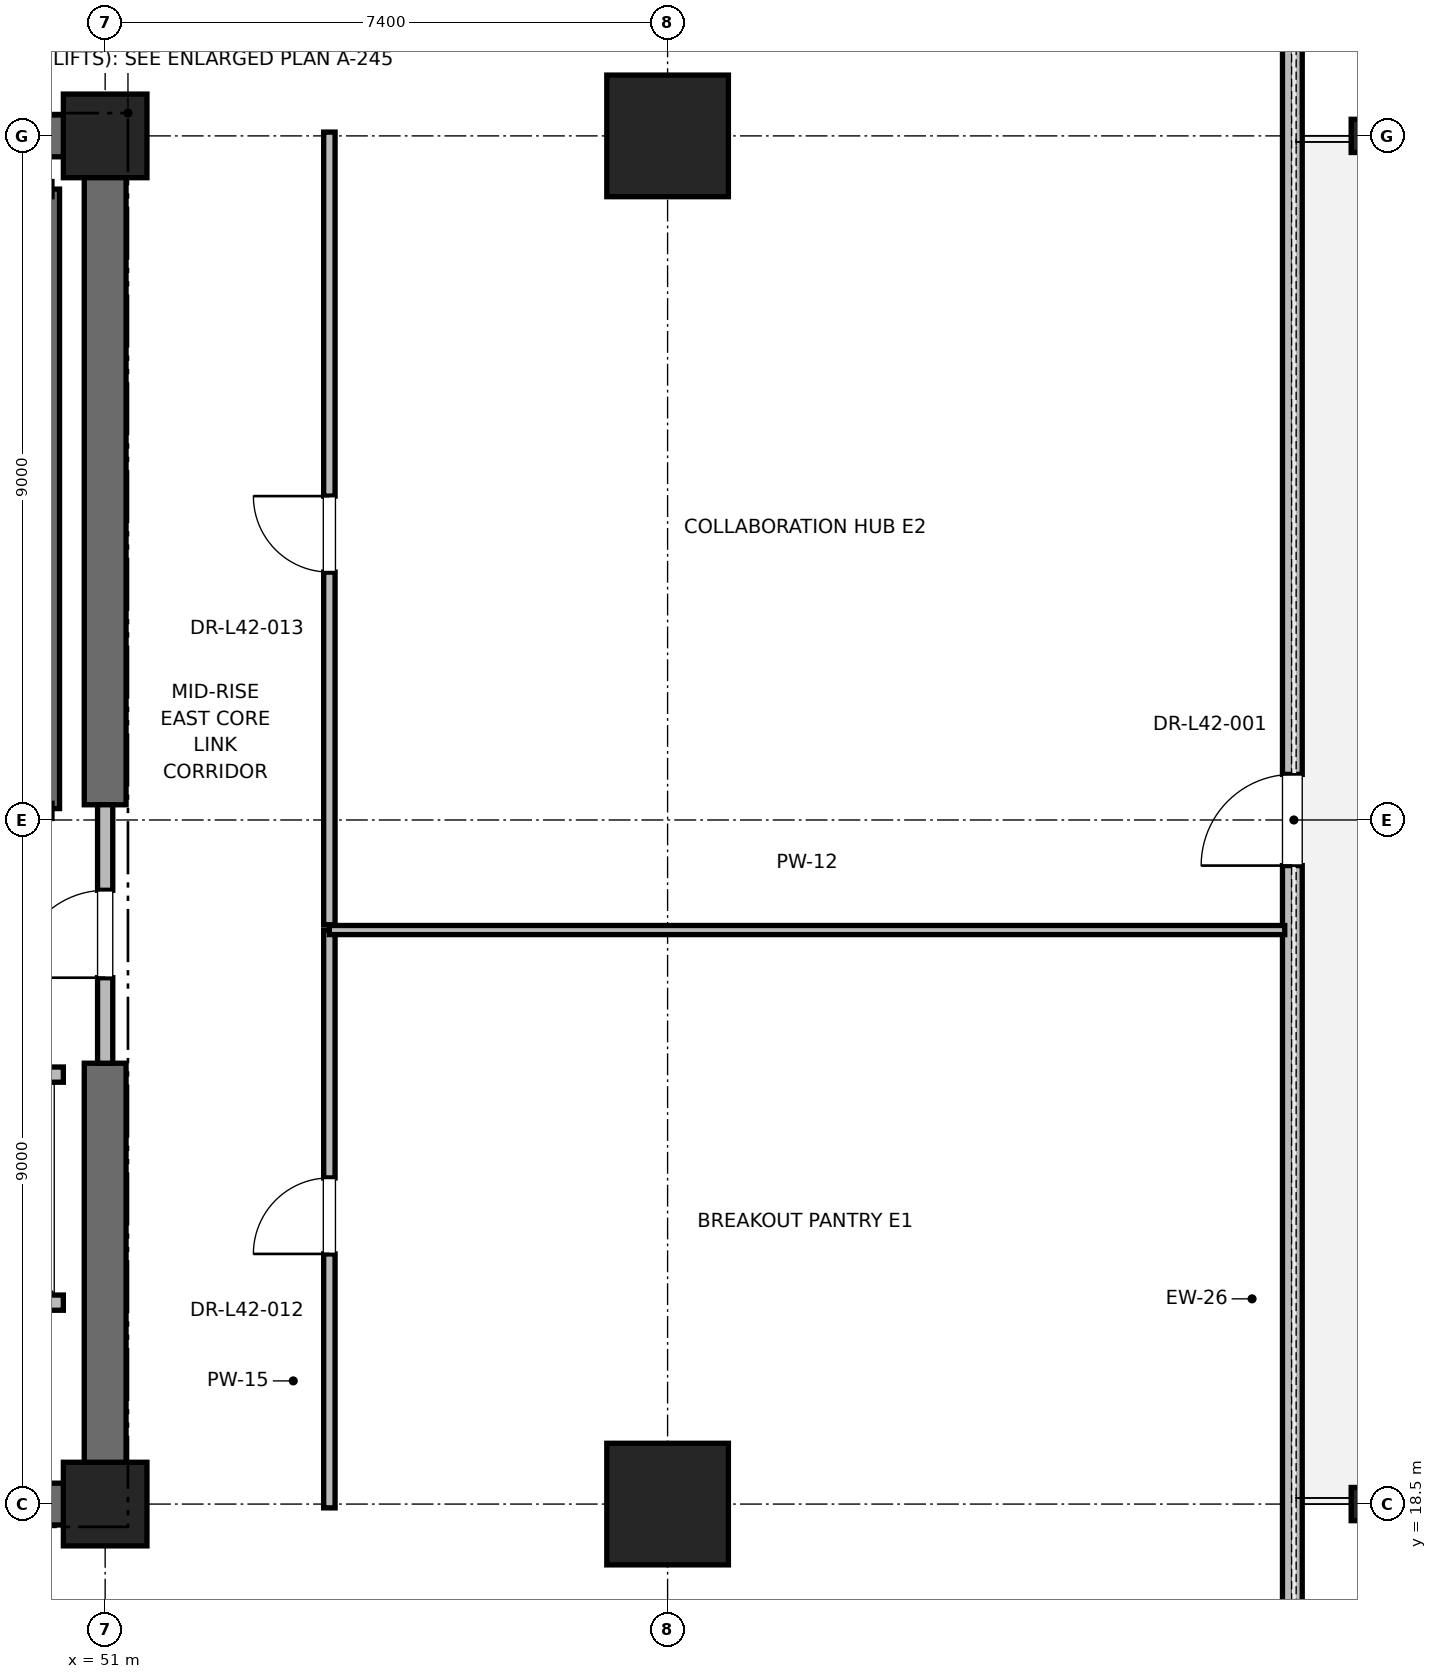
"""IFC4 building model, lengths in metres.
Left out: names, types, materials, properties, quantities, classifications, styles, units other than length and angle.
Written with IfcOpenShell. Run it as: python <this file> out.ifc"""

import sys

from ifc_helpers import new_model, si_unit, direction, frame, frame_2d, origin, origin_2d, place, context, subcontext, project, spatial, rectangle, i_section, extrude, element, fill, save


model = new_model("IFC4")
c1 = context("Model", 3, precision=1e-05, world=origin(), true_north=direction((0.0, 1.0)))
c2 = subcontext(c1, "Body", "Model", "MODEL_VIEW")
j1 = project(units=[si_unit("LENGTHUNIT", "METRE"), si_unit("PLANEANGLEUNIT", "RADIAN")], contexts=[c1])
p1 = place(None, origin())
s1 = spatial("IfcSite", under=j1, at=p1, CompositionType="ELEMENT")
p2 = place(p1, origin())
s2 = spatial("IfcBuilding", under=s1, at=p2, CompositionType="ELEMENT")
p3 = place(p2, frame((0.0, 0.0, 180.4)))
s3 = spatial("IfcBuildingStorey", under=s2, at=p3, CompositionType="ELEMENT", Elevation=180.4)
for number, where, z_axis, x_axis in (
    (1, (58.4, 18.5, 0.0), (0.0, 0.0, 1.0), (1.0, 0.0, 0.0)),
    (2, (58.4, 36.5, 0.0), (0.0, 0.0, 1.0), (1.0, 0.0, 0.0)),
):
    element("IfcColumn", number, at=place(p3, frame(where, z_axis=z_axis, x_axis=x_axis)), inside=s3, PredefinedType="COLUMN", context=c2, shape_type="SweptSolid", body=[
        extrude(rectangle(XDim=1.6, YDim=1.6, at=origin_2d()), origin(), (0.0, 0.0, 1.0), 4.0),
    ])
for number, where, z_axis, x_axis in (
    (3, (67.6, 18.5, 0.0), (0.0, 0.0, 1.0), (1.0, 0.0, 0.0)),
    (4, (67.6, 36.5, 0.0), (0.0, 0.0, 1.0), (1.0, 0.0, 0.0)),
):
    element("IfcColumn", number, at=place(p3, frame(where, z_axis=z_axis, x_axis=x_axis)), inside=s3, PredefinedType="COLUMN", context=c2, shape_type="SweptSolid", body=[
        extrude(i_section(OverallWidth=0.412, OverallDepth=0.437, WebThickness=0.036, FlangeThickness=0.058, FilletRadius=0.015, at=origin_2d()), origin(), (0.0, 0.0, 1.0), 4.0),
    ])
for number, where, z_axis, x_axis in (
    (5, (51.0, 18.5, 0.0), (0.0, 0.0, 1.0), (1.0, 0.0, 0.0)),
    (6, (51.0, 36.5, 0.0), (0.0, 0.0, 1.0), (1.0, 0.0, 0.0)),
):
    element("IfcColumn", number, at=place(p3, frame(where, z_axis=z_axis, x_axis=x_axis)), inside=s3, PredefinedType="PILASTER", context=c2, shape_type="SweptSolid", body=[
        extrude(rectangle(XDim=1.1, YDim=1.1, at=origin_2d()), origin(), (0.0, 0.0, 1.0), 4.0),
    ])
p4 = place(p3, frame((41.8, 18.5, 0.0), z_axis=(0.0, 0.0, 1.0), x_axis=(1.0, 0.0, 0.0)))
e7 = element("IfcWall", 7, at=p4, inside=s3, PredefinedType="SHEAR", context=c2, shape_type="SweptSolid", body=[
    extrude(rectangle(XDim=9.2, YDim=0.55, at=frame_2d((4.6, 0.0))), origin(), (0.0, 0.0, 1.0), 3.7),
])
for number, where, z_axis, x_axis in (
    (8, (45.2, 36.5, 0.0), (0.0, 0.0, 1.0), (1.0, 0.0, 0.0)),
    (9, (51.0, 18.5, 0.0), (0.0, 0.0, 1.0), (0.0, 1.0, 0.0)),
):
    element("IfcWall", number, at=place(p3, frame(where, z_axis=z_axis, x_axis=x_axis)), inside=s3, PredefinedType="SHEAR", context=c2, shape_type="SweptSolid", body=[
        extrude(rectangle(XDim=5.8, YDim=0.55, at=frame_2d((2.9, 0.0))), origin(), (0.0, 0.0, 1.0), 3.7),
    ])
p5 = place(p3, frame((51.0, 27.7, 0.0), z_axis=(0.0, 0.0, 1.0), x_axis=(0.0, 1.0, 0.0)))
e10 = element("IfcWall", 10, at=p5, inside=s3, PredefinedType="SHEAR", context=c2, shape_type="SweptSolid", body=[
    extrude(rectangle(XDim=8.8, YDim=0.55, at=frame_2d((4.4, 0.0))), origin(), (0.0, 0.0, 1.0), 3.7),
])
p6 = place(p3, frame((66.62, 9.3, 0.0), z_axis=(0.0, 0.0, 1.0), x_axis=(0.0, 1.0, 0.0)))
e11 = element("IfcWall", 11, at=p6, inside=s3, PredefinedType="PARAPET", context=c2, shape_type="SweptSolid", body=[
    extrude(rectangle(XDim=36.4, YDim=0.26, at=frame_2d((18.2, 0.0))), origin(), (0.0, 0.0, 1.0), 2.91),
])
p7 = place(p6, frame((4.2, 0.0, 0.85)))
e12 = element("IfcOpeningElement", 12, at=p7, cuts=e11, PredefinedType="OPENING", context=c2, shape_type="SweptSolid", body=[
    extrude(rectangle(XDim=2.0, YDim=2.3, at=frame_2d((1.0, 1.15))), frame((0.0, 0.13, 0.0), z_axis=(0.0, -1.0, 0.0), x_axis=(1.0, 0.0, 0.0)), (0.0, 0.0, 1.0), 0.26),
])
p8 = place(p6, frame((17.6, 0.0, 0.0)))
e13 = element("IfcOpeningElement", 13, at=p8, cuts=e11, PredefinedType="OPENING", context=c2, shape_type="SweptSolid", body=[
    extrude(rectangle(XDim=1.2, YDim=2.2, at=frame_2d((0.6, 1.1))), frame((0.0, 0.13, 0.0), z_axis=(0.0, -1.0, 0.0), x_axis=(1.0, 0.0, 0.0)), (0.0, 0.0, 1.0), 0.26),
])
p9 = place(p6, frame((30.2, 0.0, 0.85)))
e14 = element("IfcOpeningElement", 14, at=p9, cuts=e11, PredefinedType="OPENING", context=c2, shape_type="SweptSolid", body=[
    extrude(rectangle(XDim=2.0, YDim=2.3, at=frame_2d((1.0, 1.15))), frame((0.0, 0.13, 0.0), z_axis=(0.0, -1.0, 0.0), x_axis=(1.0, 0.0, 0.0)), (0.0, 0.0, 1.0), 0.26),
])
p10 = place(p3, frame((50.3, 27.65, 0.0), z_axis=(0.0, 0.0, 1.0), x_axis=(0.0, 1.0, 0.0)))
e15 = element("IfcWall", 15, at=p10, inside=s3, PredefinedType="SOLIDWALL", context=c2, shape_type="SweptSolid", body=[
    extrude(rectangle(XDim=8.15, YDim=0.2, at=frame_2d((4.075, 0.0))), origin(), (0.0, 0.0, 1.0), 3.7),
])
p11 = place(p3, frame((51.0, 24.3, 0.0), z_axis=(0.0, 0.0, 1.0), x_axis=(0.0, 1.0, 0.0)))
e16 = element("IfcWall", 16, at=p11, inside=s3, PredefinedType="PARTITIONING", context=c2, shape_type="SweptSolid", body=[
    extrude(rectangle(XDim=3.4, YDim=0.2, at=frame_2d((1.7, 0.0))), origin(), (0.0, 0.0, 1.0), 2.68),
])
p12 = place(p11, frame((1.125, 0.0, 0.0)))
e17 = element("IfcOpeningElement", 17, at=p12, cuts=e16, PredefinedType="OPENING", context=c2, shape_type="SweptSolid", body=[
    extrude(rectangle(XDim=1.15, YDim=2.2, at=frame_2d((0.575, 1.1))), frame((0.0, 0.1, 0.0), z_axis=(0.0, -1.0, 0.0), x_axis=(1.0, 0.0, 0.0)), (0.0, 0.0, 1.0), 0.2),
])
p13 = place(p3, frame((47.85, 21.15, 0.0), z_axis=(0.0, 0.0, 1.0), x_axis=(1.0, 0.0, 0.0)))
e18 = element("IfcWall", 18, at=p13, inside=s3, PredefinedType="SOLIDWALL", context=c2, shape_type="SweptSolid", body=[
    extrude(rectangle(XDim=2.6, YDim=0.2, at=frame_2d((1.3, 0.0))), origin(), (0.0, 0.0, 1.0), 3.7),
])
p14 = place(p3, frame((50.45, 24.15, 0.0), z_axis=(0.0, 0.0, 1.0), x_axis=(-1.0, 0.0, 0.0)))
e19 = element("IfcWall", 19, at=p14, inside=s3, PredefinedType="SOLIDWALL", context=c2, shape_type="SweptSolid", body=[
    extrude(rectangle(XDim=2.6, YDim=0.2, at=frame_2d((1.3, 0.0))), origin(), (0.0, 0.0, 1.0), 2.68),
])
p15 = place(p14, frame((0.75, 0.0, 0.0)))
e20 = element("IfcOpeningElement", 20, at=p15, cuts=e19, PredefinedType="OPENING", context=c2, shape_type="SweptSolid", body=[
    extrude(rectangle(XDim=1.1, YDim=2.2, at=frame_2d((0.55, 1.1))), frame((0.0, 0.1, 0.0), z_axis=(0.0, -1.0, 0.0), x_axis=(1.0, 0.0, 0.0)), (0.0, 0.0, 1.0), 0.2),
])
p16 = place(p3, frame((53.95, 18.45, 0.0), z_axis=(0.0, 0.0, 1.0), x_axis=(0.0, 1.0, 0.0)))
e21 = element("IfcWall", 21, at=p16, inside=s3, PredefinedType="PARTITIONING", context=c2, shape_type="SweptSolid", body=[
    extrude(rectangle(XDim=7.602, YDim=0.15, at=frame_2d((3.801, 0.0))), origin(), (0.0, 0.0, 1.0), 2.85),
])
p17 = place(p16, frame((3.341, 0.0, 0.0)))
e22 = element("IfcOpeningElement", 22, at=p17, cuts=e21, PredefinedType="OPENING", context=c2, shape_type="SweptSolid", body=[
    extrude(rectangle(XDim=1.0, YDim=2.15, at=frame_2d((0.5, 1.075))), frame((0.0, 0.075, 0.0), z_axis=(0.0, -1.0, 0.0), x_axis=(1.0, 0.0, 0.0)), (0.0, 0.0, 1.0), 0.15),
])
p18 = place(p3, frame((53.95, 26.052, 0.0), z_axis=(0.0, 0.0, 1.0), x_axis=(1.0, 0.0, 0.0)))
e23 = element("IfcWall", 23, at=p18, inside=s3, PredefinedType="PARTITIONING", context=c2, shape_type="SweptSolid", body=[
    extrude(rectangle(XDim=12.57, YDim=0.12, at=frame_2d((6.285, 0.0))), origin(), (0.0, 0.0, 1.0), 2.85),
])
p19 = place(p3, frame((53.95, 26.122, 0.0), z_axis=(0.0, 0.0, 1.0), x_axis=(0.0, 1.0, 0.0)))
e24 = element("IfcWall", 24, at=p19, inside=s3, PredefinedType="PARTITIONING", context=c2, shape_type="SweptSolid", body=[
    extrude(rectangle(XDim=10.428, YDim=0.15, at=frame_2d((5.214, 0.0))), origin(), (0.0, 0.0, 1.0), 2.85),
])
p20 = place(p19, frame((4.639, 0.0, 0.0)))
e25 = element("IfcOpeningElement", 25, at=p20, cuts=e24, PredefinedType="OPENING", context=c2, shape_type="SweptSolid", body=[
    extrude(rectangle(XDim=1.0, YDim=2.15, at=frame_2d((0.5, 1.075))), frame((0.0, 0.075, 0.0), z_axis=(0.0, -1.0, 0.0), x_axis=(1.0, 0.0, 0.0)), (0.0, 0.0, 1.0), 0.15),
])
p21 = place(p8, origin())
e26 = element("IfcDoor", 26, at=p21, inside=s3, OperationType="SINGLE_SWING_LEFT", PredefinedType="DOOR", context=c2, shape_type="SweptSolid", body=[
    extrude(rectangle(XDim=1.2, YDim=2.2, at=frame_2d((0.6, 1.1))), frame((0.0, 0.025, 0.0), z_axis=(0.0, -1.0, 0.0), x_axis=(1.0, 0.0, 0.0)), (0.0, 0.0, 1.0), 0.05),
])
fill(e13, e26)
p22 = place(p12, origin())
e27 = element("IfcDoor", 27, at=p22, inside=s3, OperationType="SINGLE_SWING_LEFT", PredefinedType="DOOR", context=c2, shape_type="SweptSolid", body=[
    extrude(rectangle(XDim=1.15, YDim=2.2, at=frame_2d((0.575, 1.1))), frame((0.0, 0.025, 0.0), z_axis=(0.0, -1.0, 0.0), x_axis=(1.0, 0.0, 0.0)), (0.0, 0.0, 1.0), 0.05),
])
fill(e17, e27)
p23 = place(p17, origin())
e28 = element("IfcDoor", 28, at=p23, inside=s3, OperationType="SINGLE_SWING_LEFT", PredefinedType="DOOR", context=c2, shape_type="SweptSolid", body=[
    extrude(rectangle(XDim=1.0, YDim=2.15, at=frame_2d((0.5, 1.075))), frame((0.0, 0.025, 0.0), z_axis=(0.0, -1.0, 0.0), x_axis=(1.0, 0.0, 0.0)), (0.0, 0.0, 1.0), 0.05),
])
fill(e22, e28)
p24 = place(p20, origin())
e29 = element("IfcDoor", 29, at=p24, inside=s3, OperationType="SINGLE_SWING_RIGHT", PredefinedType="DOOR", context=c2, shape_type="SweptSolid", body=[
    extrude(rectangle(XDim=1.0, YDim=2.15, at=frame_2d((0.5, 1.075))), frame((0.0, 0.025, 0.0), z_axis=(0.0, -1.0, 0.0), x_axis=(1.0, 0.0, 0.0)), (0.0, 0.0, 1.0), 0.05),
])
fill(e25, e29)
save(model, sys.argv[1])
